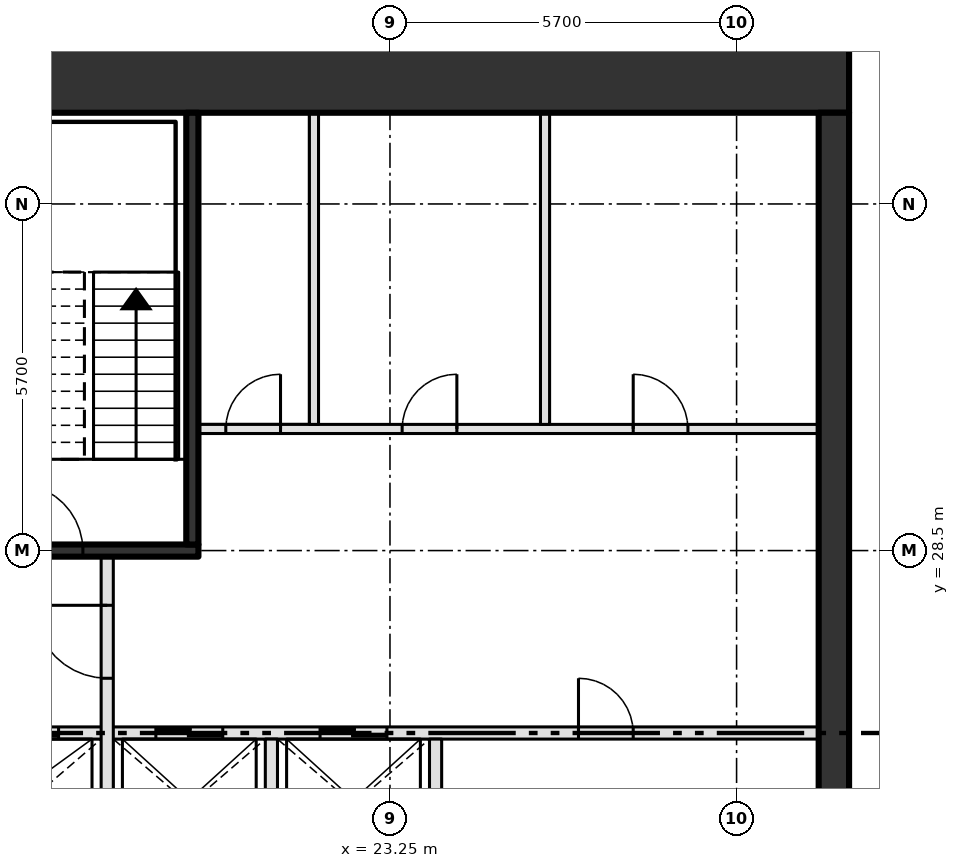
"""IFC4 building model, lengths in metres.
Left out: names, types, materials, properties, quantities, classifications, styles, units other than length and angle.
Written with IfcOpenShell. Run it as: python <this file> out.ifc"""

import sys

from ifc_helpers import new_model, si_unit, direction, frame, frame_2d, origin, place, context, subcontext, project, spatial, rectangle, extrude, element, fill, save


model = new_model("IFC4")
c1 = context("Model", 3, precision=1e-05, world=origin(), true_north=direction((0.0, 1.0)))
c2 = subcontext(c1, "Body", "Model", "MODEL_VIEW")
j1 = project(units=[si_unit("LENGTHUNIT", "METRE"), si_unit("PLANEANGLEUNIT", "RADIAN")], contexts=[c1])
p1 = place(None, origin())
s1 = spatial("IfcSite", under=j1, at=p1, CompositionType="ELEMENT")
p2 = place(p1, origin())
s2 = spatial("IfcBuilding", under=s1, at=p2, CompositionType="ELEMENT")
p3 = place(p2, frame((0.0, 0.0, 375.0)))
s3 = spatial("IfcBuildingStorey", under=s2, at=p3, CompositionType="ELEMENT", Elevation=375.0)
p4 = place(p3, frame((8.0, 36.3, -0.3), z_axis=(0.0, 0.0, 1.0), x_axis=(1.0, 0.0, 0.0)))
e1 = element("IfcWall", 1, at=p4, inside=s3, PredefinedType="SHEAR", context=c2, shape_type="SweptSolid", body=[
    extrude(rectangle(XDim=22.8, YDim=1.2, at=frame_2d((11.4, 0.0))), origin(), (0.0, 0.0, 1.0), 4.2),
])
p5 = place(p4, frame((2.3, 0.0, 0.3)))
e2 = element("IfcOpeningElement", 2, at=p5, cuts=e1, PredefinedType="OPENING", context=c2, shape_type="SweptSolid", body=[
    extrude(rectangle(XDim=1.8, YDim=2.1, at=frame_2d((0.9, 1.05))), frame((0.0, 0.61, 0.0), z_axis=(0.0, -1.0, 0.0), x_axis=(1.0, 0.0, 0.0)), (0.0, 0.0, 1.0), 1.22),
])
p6 = place(p3, frame((30.55, 14.6, -0.3), z_axis=(0.0, 0.0, 1.0), x_axis=(0.0, 1.0, 0.0)))
e3 = element("IfcWall", 3, at=p6, inside=s3, PredefinedType="SHEAR", context=c2, shape_type="SweptSolid", body=[
    extrude(rectangle(XDim=21.1, YDim=0.5, at=frame_2d((10.55, 0.0))), origin(), (0.0, 0.0, 1.0), 4.2),
])
p7 = place(p3, frame((13.35, 25.5, 0.0), z_axis=(0.0, 0.0, 1.0), x_axis=(1.0, 0.0, 0.0)))
e4 = element("IfcWall", 4, at=p7, inside=s3, PredefinedType="SOLIDWALL", context=c2, shape_type="SweptSolid", body=[
    extrude(rectangle(XDim=16.95, YDim=0.2, at=frame_2d((8.475, 0.0))), origin(), (0.0, 0.0, 1.0), 3.9),
])
p8 = place(p7, frame((0.65, 0.0, 0.0)))
e5 = element("IfcOpeningElement", 5, at=p8, cuts=e4, PredefinedType="OPENING", context=c2, shape_type="SweptSolid", body=[
    extrude(rectangle(XDim=1.1, YDim=2.1, at=frame_2d((0.55, 1.05))), frame((0.0, 0.11, 0.0), z_axis=(0.0, -1.0, 0.0), x_axis=(1.0, 0.0, 0.0)), (0.0, 0.0, 1.0), 0.22),
])
p9 = place(p7, frame((3.35, 0.0, 0.0)))
e6 = element("IfcOpeningElement", 6, at=p9, cuts=e4, PredefinedType="OPENING", context=c2, shape_type="SweptSolid", body=[
    extrude(rectangle(XDim=1.1, YDim=2.1, at=frame_2d((0.55, 1.05))), frame((0.0, 0.11, 0.0), z_axis=(0.0, -1.0, 0.0), x_axis=(1.0, 0.0, 0.0)), (0.0, 0.0, 1.0), 0.22),
])
p10 = place(p7, frame((6.05, 0.0, 0.0)))
e7 = element("IfcOpeningElement", 7, at=p10, cuts=e4, PredefinedType="OPENING", context=c2, shape_type="SweptSolid", body=[
    extrude(rectangle(XDim=1.1, YDim=2.1, at=frame_2d((0.55, 1.05))), frame((0.0, 0.11, 0.0), z_axis=(0.0, -1.0, 0.0), x_axis=(1.0, 0.0, 0.0)), (0.0, 0.0, 1.0), 0.22),
])
p11 = place(p7, frame((8.75, 0.0, 0.0)))
e8 = element("IfcOpeningElement", 8, at=p11, cuts=e4, PredefinedType="OPENING", context=c2, shape_type="SweptSolid", body=[
    extrude(rectangle(XDim=1.1, YDim=2.1, at=frame_2d((0.55, 1.05))), frame((0.0, 0.11, 0.0), z_axis=(0.0, -1.0, 0.0), x_axis=(1.0, 0.0, 0.0)), (0.0, 0.0, 1.0), 0.22),
])
p12 = place(p7, frame((13.0, 0.0, 0.0)))
e9 = element("IfcOpeningElement", 9, at=p12, cuts=e4, PredefinedType="OPENING", context=c2, shape_type="SweptSolid", body=[
    extrude(rectangle(XDim=0.9, YDim=2.1, at=frame_2d((0.45, 1.05))), frame((0.0, 0.11, 0.0), z_axis=(0.0, -1.0, 0.0), x_axis=(1.0, 0.0, 0.0)), (0.0, 0.0, 1.0), 0.22),
])
p13 = place(p3, frame((13.35, 28.5, 0.0), z_axis=(0.0, 0.0, 1.0), x_axis=(1.0, 0.0, 0.0)))
e10 = element("IfcWall", 10, at=p13, inside=s3, PredefinedType="SOLIDWALL", context=c2, shape_type="SweptSolid", body=[
    extrude(rectangle(XDim=6.75, YDim=0.2, at=frame_2d((3.375, 0.0))), origin(), (0.0, 0.0, 1.0), 3.9),
])
p14 = place(p13, frame((0.95, 0.0, 0.0)))
e11 = element("IfcOpeningElement", 11, at=p14, cuts=e10, PredefinedType="OPENING", context=c2, shape_type="SweptSolid", body=[
    extrude(rectangle(XDim=1.2, YDim=2.1, at=frame_2d((0.6, 1.05))), frame((0.0, 0.11, 0.0), z_axis=(0.0, -1.0, 0.0), x_axis=(1.0, 0.0, 0.0)), (0.0, 0.0, 1.0), 0.22),
])
p15 = place(p13, frame((3.75, 0.0, 0.0)))
e12 = element("IfcOpeningElement", 12, at=p15, cuts=e10, PredefinedType="OPENING", context=c2, shape_type="SweptSolid", body=[
    extrude(rectangle(XDim=1.1, YDim=2.1, at=frame_2d((0.55, 1.05))), frame((0.0, 0.11, 0.0), z_axis=(0.0, -1.0, 0.0), x_axis=(1.0, 0.0, 0.0)), (0.0, 0.0, 1.0), 0.22),
])
p16 = place(p3, frame((20.1, 30.5, 0.0), z_axis=(0.0, 0.0, 1.0), x_axis=(1.0, 0.0, 0.0)))
e13 = element("IfcWall", 13, at=p16, inside=s3, PredefinedType="PARTITIONING", context=c2, shape_type="SweptSolid", body=[
    extrude(rectangle(XDim=10.2, YDim=0.15, at=frame_2d((5.1, 0.0))), origin(), (0.0, 0.0, 1.0), 3.9),
])
p17 = place(p16, frame((0.45, 0.0, 0.0)))
e14 = element("IfcOpeningElement", 14, at=p17, cuts=e13, PredefinedType="OPENING", context=c2, shape_type="SweptSolid", body=[
    extrude(rectangle(XDim=0.9, YDim=2.1, at=frame_2d((0.45, 1.05))), frame((0.0, 0.085, 0.0), z_axis=(0.0, -1.0, 0.0), x_axis=(1.0, 0.0, 0.0)), (0.0, 0.0, 1.0), 0.17),
])
p18 = place(p16, frame((3.35, 0.0, 0.0)))
e15 = element("IfcOpeningElement", 15, at=p18, cuts=e13, PredefinedType="OPENING", context=c2, shape_type="SweptSolid", body=[
    extrude(rectangle(XDim=0.9, YDim=2.1, at=frame_2d((0.45, 1.05))), frame((0.0, 0.085, 0.0), z_axis=(0.0, -1.0, 0.0), x_axis=(1.0, 0.0, 0.0)), (0.0, 0.0, 1.0), 0.17),
])
p19 = place(p16, frame((7.15, 0.0, 0.0)))
e16 = element("IfcOpeningElement", 16, at=p19, cuts=e13, PredefinedType="OPENING", context=c2, shape_type="SweptSolid", body=[
    extrude(rectangle(XDim=0.9, YDim=2.1, at=frame_2d((0.45, 1.05))), frame((0.0, 0.085, 0.0), z_axis=(0.0, -1.0, 0.0), x_axis=(1.0, 0.0, 0.0)), (0.0, 0.0, 1.0), 0.17),
])
p20 = place(p3, frame((18.6, 23.25, 0.0), z_axis=(0.0, 0.0, 1.0), x_axis=(0.0, 1.0, 0.0)))
e17 = element("IfcWall", 17, at=p20, inside=s3, PredefinedType="SOLIDWALL", context=c2, shape_type="SweptSolid", body=[
    extrude(rectangle(XDim=5.15, YDim=0.2, at=frame_2d((2.575, 0.0))), origin(), (0.0, 0.0, 1.0), 3.9),
])
p21 = place(p20, frame((3.15, 0.0, 0.0)))
e18 = element("IfcOpeningElement", 18, at=p21, cuts=e17, PredefinedType="OPENING", context=c2, shape_type="SweptSolid", body=[
    extrude(rectangle(XDim=1.2, YDim=2.1, at=frame_2d((0.6, 1.05))), frame((0.0, 0.11, 0.0), z_axis=(0.0, -1.0, 0.0), x_axis=(1.0, 0.0, 0.0)), (0.0, 0.0, 1.0), 0.22),
])
p22 = place(p3, frame((20.0, 28.6, 0.0), z_axis=(0.0, 0.0, 1.0), x_axis=(0.0, 1.0, 0.0)))
e19 = element("IfcWall", 19, at=p22, inside=s3, PredefinedType="SOLIDWALL", context=c2, shape_type="SweptSolid", body=[
    extrude(rectangle(XDim=7.1, YDim=0.2, at=frame_2d((3.55, 0.0))), origin(), (0.0, 0.0, 1.0), 3.9),
])
p23 = place(p3, frame((21.3, 20.775, 0.0), z_axis=(0.0, 0.0, 1.0), x_axis=(0.0, 1.0, 0.0)))
e20 = element("IfcWall", 20, at=p23, inside=s3, PredefinedType="SOLIDWALL", context=c2, shape_type="SweptSolid", body=[
    extrude(rectangle(XDim=4.625, YDim=0.2, at=frame_2d((2.312, 0.0))), origin(), (0.0, 0.0, 1.0), 3.9),
])
p24 = place(p3, frame((22.0, 30.575, 0.0), z_axis=(0.0, 0.0, 1.0), x_axis=(0.0, 1.0, 0.0)))
e21 = element("IfcWall", 21, at=p24, inside=s3, PredefinedType="PARTITIONING", context=c2, shape_type="SweptSolid", body=[
    extrude(rectangle(XDim=5.125, YDim=0.15, at=frame_2d((2.562, 0.0))), origin(), (0.0, 0.0, 1.0), 3.9),
])
p25 = place(p3, frame((24.0, 23.25, 0.0), z_axis=(0.0, 0.0, 1.0), x_axis=(0.0, 1.0, 0.0)))
e22 = element("IfcWall", 22, at=p25, inside=s3, PredefinedType="SOLIDWALL", context=c2, shape_type="SweptSolid", body=[
    extrude(rectangle(XDim=2.15, YDim=0.2, at=frame_2d((1.075, 0.0))), origin(), (0.0, 0.0, 1.0), 3.9),
])
p26 = place(p3, frame((25.8, 30.575, 0.0), z_axis=(0.0, 0.0, 1.0), x_axis=(0.0, 1.0, 0.0)))
e23 = element("IfcWall", 23, at=p26, inside=s3, PredefinedType="PARTITIONING", context=c2, shape_type="SweptSolid", body=[
    extrude(rectangle(XDim=5.125, YDim=0.15, at=frame_2d((2.562, 0.0))), origin(), (0.0, 0.0, 1.0), 3.9),
])
p27 = place(p9, origin())
e24 = element("IfcDoor", 24, at=p27, inside=s3, OperationType="SLIDING_TO_LEFT", PredefinedType="DOOR", context=c2, shape_type="SweptSolid", body=[
    extrude(rectangle(XDim=1.1, YDim=2.1, at=frame_2d((0.55, 1.05))), frame((0.0, 0.025, 0.0), z_axis=(0.0, -1.0, 0.0), x_axis=(1.0, 0.0, 0.0)), (0.0, 0.0, 1.0), 0.05),
])
fill(e6, e24)
p28 = place(p10, origin())
e25 = element("IfcDoor", 25, at=p28, inside=s3, OperationType="SLIDING_TO_LEFT", PredefinedType="DOOR", context=c2, shape_type="SweptSolid", body=[
    extrude(rectangle(XDim=1.1, YDim=2.1, at=frame_2d((0.55, 1.05))), frame((0.0, 0.025, 0.0), z_axis=(0.0, -1.0, 0.0), x_axis=(1.0, 0.0, 0.0)), (0.0, 0.0, 1.0), 0.05),
])
fill(e7, e25)
p29 = place(p11, origin())
e26 = element("IfcDoor", 26, at=p29, inside=s3, OperationType="SLIDING_TO_LEFT", PredefinedType="DOOR", context=c2, shape_type="SweptSolid", body=[
    extrude(rectangle(XDim=1.1, YDim=2.1, at=frame_2d((0.55, 1.05))), frame((0.0, 0.025, 0.0), z_axis=(0.0, -1.0, 0.0), x_axis=(1.0, 0.0, 0.0)), (0.0, 0.0, 1.0), 0.05),
])
fill(e8, e26)
p30 = place(p12, origin())
e27 = element("IfcDoor", 27, at=p30, inside=s3, OperationType="SINGLE_SWING_LEFT", PredefinedType="DOOR", context=c2, shape_type="SweptSolid", body=[
    extrude(rectangle(XDim=0.9, YDim=2.1, at=frame_2d((0.45, 1.05))), frame((0.0, 0.025, 0.0), z_axis=(0.0, -1.0, 0.0), x_axis=(1.0, 0.0, 0.0)), (0.0, 0.0, 1.0), 0.05),
])
fill(e9, e27)
p31 = place(p17, origin())
e28 = element("IfcDoor", 28, at=p31, inside=s3, OperationType="SINGLE_SWING_RIGHT", PredefinedType="DOOR", context=c2, shape_type="SweptSolid", body=[
    extrude(rectangle(XDim=0.9, YDim=2.1, at=frame_2d((0.45, 1.05))), frame((0.0, 0.025, 0.0), z_axis=(0.0, -1.0, 0.0), x_axis=(1.0, 0.0, 0.0)), (0.0, 0.0, 1.0), 0.05),
])
fill(e14, e28)
p32 = place(p18, origin())
e29 = element("IfcDoor", 29, at=p32, inside=s3, OperationType="SINGLE_SWING_RIGHT", PredefinedType="DOOR", context=c2, shape_type="SweptSolid", body=[
    extrude(rectangle(XDim=0.9, YDim=2.1, at=frame_2d((0.45, 1.05))), frame((0.0, 0.025, 0.0), z_axis=(0.0, -1.0, 0.0), x_axis=(1.0, 0.0, 0.0)), (0.0, 0.0, 1.0), 0.05),
])
fill(e15, e29)
p33 = place(p19, origin())
e30 = element("IfcDoor", 30, at=p33, inside=s3, OperationType="SINGLE_SWING_LEFT", PredefinedType="DOOR", context=c2, shape_type="SweptSolid", body=[
    extrude(rectangle(XDim=0.9, YDim=2.1, at=frame_2d((0.45, 1.05))), frame((0.0, 0.025, 0.0), z_axis=(0.0, -1.0, 0.0), x_axis=(1.0, 0.0, 0.0)), (0.0, 0.0, 1.0), 0.05),
])
fill(e16, e30)
p34 = place(p15, origin())
e31 = element("IfcDoor", 31, at=p34, inside=s3, OperationType="SINGLE_SWING_LEFT", PredefinedType="DOOR", context=c2, shape_type="SweptSolid", body=[
    extrude(rectangle(XDim=1.1, YDim=2.1, at=frame_2d((0.55, 1.05))), frame((0.0, 0.025, 0.0), z_axis=(0.0, -1.0, 0.0), x_axis=(1.0, 0.0, 0.0)), (0.0, 0.0, 1.0), 0.05),
])
fill(e12, e31)
p35 = place(p21, origin())
e32 = element("IfcDoor", 32, at=p35, inside=s3, OperationType="SINGLE_SWING_RIGHT", PredefinedType="DOOR", context=c2, shape_type="SweptSolid", body=[
    extrude(rectangle(XDim=1.2, YDim=2.1, at=frame_2d((0.6, 1.05))), frame((0.0, 0.025, 0.0), z_axis=(0.0, -1.0, 0.0), x_axis=(1.0, 0.0, 0.0)), (0.0, 0.0, 1.0), 0.05),
])
fill(e18, e32)
save(model, sys.argv[1])
